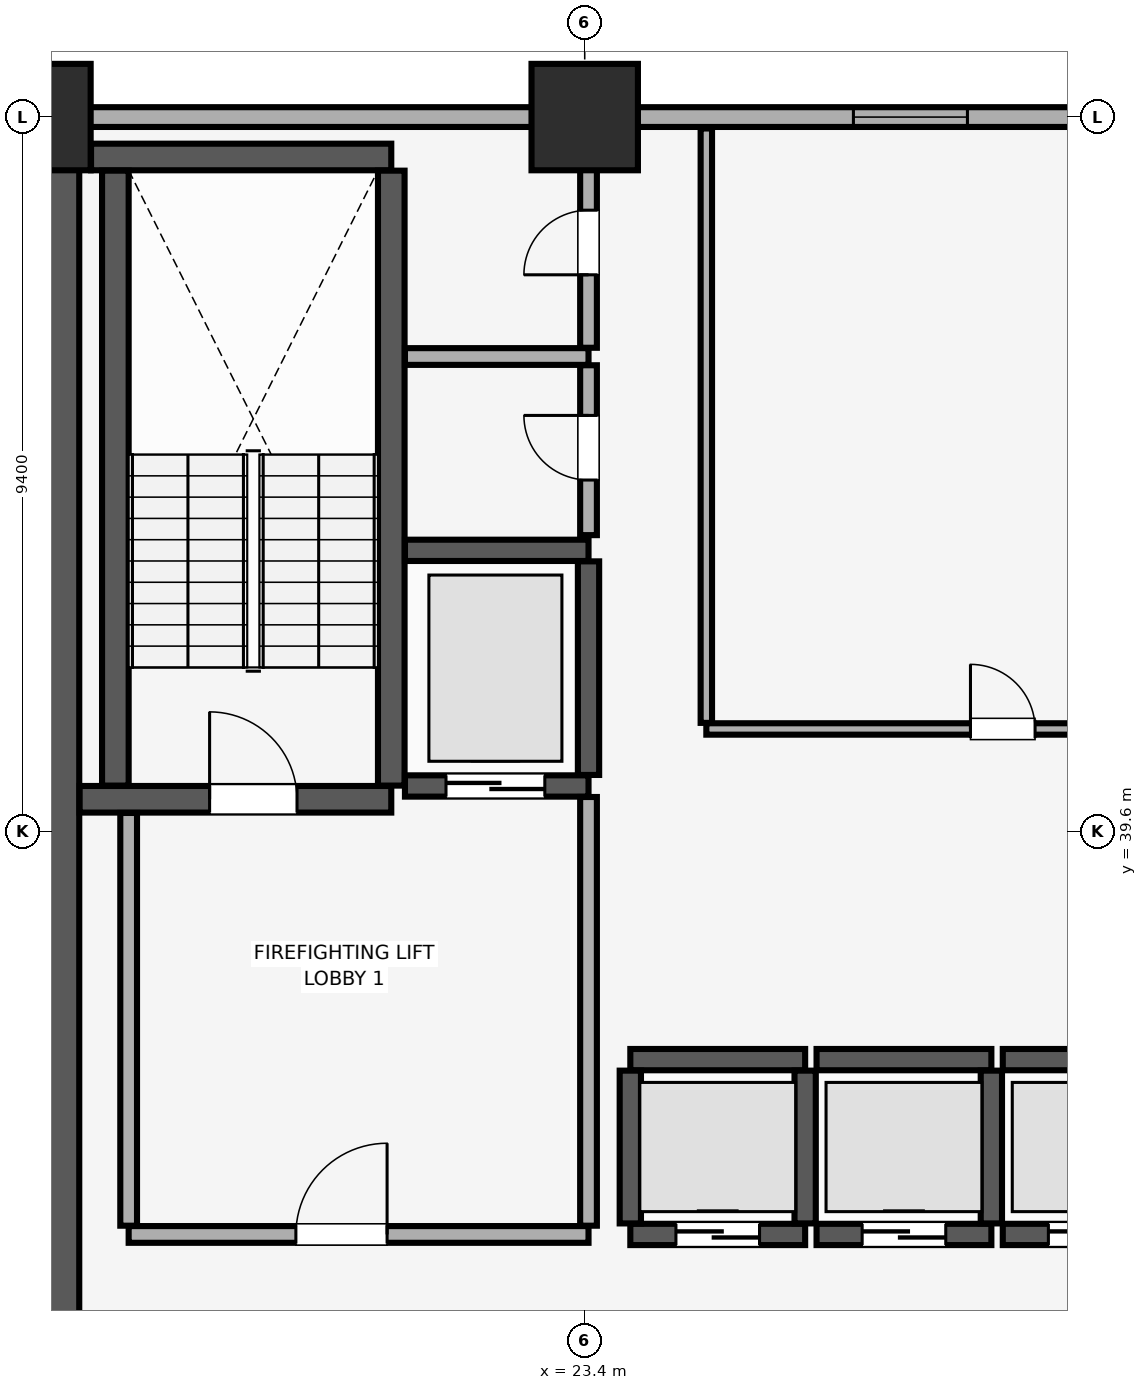
"""IFC4 building model, lengths in metres.
Left out: names, types, materials, properties, quantities, classifications, styles, units other than length and angle.
Written with IfcOpenShell. Run it as: python <this file> out.ifc"""

import sys

from ifc_helpers import new_model, si_unit, direction, frame, frame_2d, origin, origin_2d, place, context, subcontext, project, spatial, rectangle, extrude, element, fill, save


model = new_model("IFC4")
c1 = context("Model", 3, precision=1e-05, world=origin(), true_north=direction((0.0, 1.0)))
c2 = subcontext(c1, "Body", "Model", "MODEL_VIEW")
j1 = project(units=[si_unit("LENGTHUNIT", "METRE"), si_unit("PLANEANGLEUNIT", "RADIAN")], contexts=[c1])
p1 = place(None, origin())
s1 = spatial("IfcSite", under=j1, at=p1, CompositionType="ELEMENT")
p2 = place(p1, origin())
s2 = spatial("IfcBuilding", under=s1, at=p2, CompositionType="ELEMENT")
p3 = place(p2, frame((0.0, 0.0, 46.4)))
s3 = spatial("IfcBuildingStorey", under=s2, at=p3, CompositionType="ELEMENT", Elevation=46.4)
for number, where, z_axis, x_axis in (
    (1, (16.2, 49.0, 0.0), (0.0, 0.0, 1.0), (1.0, 0.0, 0.0)),
    (2, (23.4, 49.0, 0.0), (0.0, 0.0, 1.0), (1.0, 0.0, 0.0)),
):
    element("IfcColumn", number, at=place(p3, frame(where, z_axis=z_axis, x_axis=x_axis)), inside=s3, PredefinedType="COLUMN", context=c2, shape_type="SweptSolid", body=[
        extrude(rectangle(XDim=1.4, YDim=1.4, at=origin_2d()), origin(), (0.0, 0.0, 1.0), 3.51),
    ])
p4 = place(p3, frame((79.8, 49.0, 0.0), z_axis=(0.0, 0.0, 1.0), x_axis=(-1.0, 0.0, 0.0)))
e3 = element("IfcWall", 3, at=p4, inside=s3, PredefinedType="SOLIDWALL", context=c2, shape_type="SweptSolid", body=[
    extrude(rectangle(XDim=75.6, YDim=0.26, at=frame_2d((37.8, 0.0))), origin(), (0.0, 0.0, 1.0), 2.56),
])
p5 = place(p4, frame((72.565, 0.0, 0.85)))
e4 = element("IfcOpeningElement", 4, at=p5, cuts=e3, PredefinedType="OPENING", context=c2, shape_type="SweptSolid", body=[
    extrude(rectangle(XDim=1.5, YDim=1.4, at=frame_2d((0.75, 0.7))), frame((0.0, 0.14, 0.0), z_axis=(0.0, -1.0, 0.0), x_axis=(1.0, 0.0, 0.0)), (0.0, 0.0, 1.0), 0.28),
])
p6 = place(p4, frame((67.45, 0.0, 0.85)))
e5 = element("IfcOpeningElement", 5, at=p6, cuts=e3, PredefinedType="OPENING", context=c2, shape_type="SweptSolid", body=[
    extrude(rectangle(XDim=1.5, YDim=1.4, at=frame_2d((0.75, 0.7))), frame((0.0, 0.14, 0.0), z_axis=(0.0, -1.0, 0.0), x_axis=(1.0, 0.0, 0.0)), (0.0, 0.0, 1.0), 0.28),
])
p7 = place(p4, frame((6.65, 0.0, 0.85)))
e6 = element("IfcOpeningElement", 6, at=p7, cuts=e3, PredefinedType="OPENING", context=c2, shape_type="SweptSolid", body=[
    extrude(rectangle(XDim=1.5, YDim=1.4, at=frame_2d((0.75, 0.7))), frame((0.0, 0.14, 0.0), z_axis=(0.0, -1.0, 0.0), x_axis=(1.0, 0.0, 0.0)), (0.0, 0.0, 1.0), 0.28),
])
p8 = place(p4, frame((1.535, 0.0, 0.85)))
e7 = element("IfcOpeningElement", 7, at=p8, cuts=e3, PredefinedType="OPENING", context=c2, shape_type="SweptSolid", body=[
    extrude(rectangle(XDim=1.5, YDim=1.4, at=frame_2d((0.75, 0.7))), frame((0.0, 0.14, 0.0), z_axis=(0.0, -1.0, 0.0), x_axis=(1.0, 0.0, 0.0)), (0.0, 0.0, 1.0), 0.28),
])
p9 = place(p4, frame((51.365, 0.0, 0.9)))
e8 = element("IfcOpeningElement", 8, at=p9, cuts=e3, PredefinedType="OPENING", context=c2, shape_type="SweptSolid", body=[
    extrude(rectangle(XDim=1.5, YDim=1.4, at=frame_2d((0.75, 0.7))), frame((0.0, 0.14, 0.0), z_axis=(0.0, -1.0, 0.0), x_axis=(1.0, 0.0, 0.0)), (0.0, 0.0, 1.0), 0.28),
])
p10 = place(p4, frame((44.55, 0.0, 0.9)))
e9 = element("IfcOpeningElement", 9, at=p10, cuts=e3, PredefinedType="OPENING", context=c2, shape_type="SweptSolid", body=[
    extrude(rectangle(XDim=1.5, YDim=1.4, at=frame_2d((0.75, 0.7))), frame((0.0, 0.14, 0.0), z_axis=(0.0, -1.0, 0.0), x_axis=(1.0, 0.0, 0.0)), (0.0, 0.0, 1.0), 0.28),
])
p11 = place(p4, frame((28.1, 0.0, 0.9)))
e10 = element("IfcOpeningElement", 10, at=p11, cuts=e3, PredefinedType="OPENING", context=c2, shape_type="SweptSolid", body=[
    extrude(rectangle(XDim=1.5, YDim=1.4, at=frame_2d((0.75, 0.7))), frame((0.0, 0.14, 0.0), z_axis=(0.0, -1.0, 0.0), x_axis=(1.0, 0.0, 0.0)), (0.0, 0.0, 1.0), 0.28),
])
p12 = place(p4, frame((23.485, 0.0, 0.9)))
e11 = element("IfcOpeningElement", 11, at=p12, cuts=e3, PredefinedType="OPENING", context=c2, shape_type="SweptSolid", body=[
    extrude(rectangle(XDim=1.5, YDim=1.4, at=frame_2d((0.75, 0.7))), frame((0.0, 0.14, 0.0), z_axis=(0.0, -1.0, 0.0), x_axis=(1.0, 0.0, 0.0)), (0.0, 0.0, 1.0), 0.28),
])
p13 = place(p3, frame((16.2, 29.4, 0.0), z_axis=(0.0, 0.0, 1.0), x_axis=(0.0, 1.0, 0.0)))
e12 = element("IfcWall", 12, at=p13, inside=s3, PredefinedType="SHEAR", context=c2, shape_type="SweptSolid", body=[
    extrude(rectangle(XDim=19.2, YDim=1.1, at=frame_2d((9.6, 0.0))), origin(), (0.0, 0.0, 1.0), 3.51),
])
p14 = place(p3, frame((16.755, 40.025, 0.0), z_axis=(0.0, 0.0, 1.0), x_axis=(1.0, 0.0, 0.0)))
e13 = element("IfcWall", 13, at=p14, inside=s3, PredefinedType="SHEAR", context=c2, shape_type="SweptSolid", body=[
    extrude(rectangle(XDim=4.1, YDim=0.35, at=frame_2d((2.05, 0.0))), origin(), (0.0, 0.0, 1.0), 3.51),
])
p15 = place(p14, frame((1.71, 0.0, 0.0)))
e14 = element("IfcOpeningElement", 14, at=p15, cuts=e13, PredefinedType="OPENING", context=c2, shape_type="SweptSolid", body=[
    extrude(rectangle(XDim=1.15, YDim=2.15, at=frame_2d((0.575, 1.075))), frame((0.0, 0.185, 0.0), z_axis=(0.0, -1.0, 0.0), x_axis=(1.0, 0.0, 0.0)), (0.0, 0.0, 1.0), 0.37),
])
p16 = place(p3, frame((16.905, 48.475, 0.0), z_axis=(0.0, 0.0, 1.0), x_axis=(1.0, 0.0, 0.0)))
e15 = element("IfcWall", 15, at=p16, inside=s3, PredefinedType="SHEAR", context=c2, shape_type="SweptSolid", body=[
    extrude(rectangle(XDim=3.95, YDim=0.35, at=frame_2d((1.975, 0.0))), origin(), (0.0, 0.0, 1.0), 3.51),
])
for number, where, z_axis, x_axis in (
    (16, (17.225, 40.205, 0.0), (0.0, 0.0, 1.0), (0.0, 1.0, 0.0)),
    (17, (20.855, 40.205, 0.0), (0.0, 0.0, 1.0), (0.0, 1.0, 0.0)),
):
    element("IfcWall", number, at=place(p3, frame(where, z_axis=z_axis, x_axis=x_axis)), inside=s3, PredefinedType="SHEAR", context=c2, shape_type="SweptSolid", body=[
        extrude(rectangle(XDim=8.09, YDim=0.35, at=frame_2d((4.045, 0.0))), origin(), (0.0, 0.0, 1.0), 3.51),
    ])
p17 = place(p3, frame((24.0, 34.3, 0.0), z_axis=(0.0, 0.0, 1.0), x_axis=(1.0, 0.0, 0.0)))
e18 = element("IfcWall", 18, at=p17, inside=s3, PredefinedType="SHEAR", context=c2, shape_type="SweptSolid", body=[
    extrude(rectangle(XDim=2.3, YDim=0.28, at=frame_2d((1.15, 0.0))), origin(), (0.0, 0.0, 1.0), 3.51),
])
p18 = place(p17, frame((0.6, 0.0, 0.0)))
e19 = element("IfcOpeningElement", 19, at=p18, cuts=e18, PredefinedType="OPENING", context=c2, shape_type="SweptSolid", body=[
    extrude(rectangle(XDim=1.1, YDim=2.2, at=frame_2d((0.55, 1.1))), frame((0.0, 0.15, 0.0), z_axis=(0.0, -1.0, 0.0), x_axis=(1.0, 0.0, 0.0)), (0.0, 0.0, 1.0), 0.3),
])
p19 = place(p3, frame((24.0, 36.6, 0.0), z_axis=(0.0, 0.0, 1.0), x_axis=(1.0, 0.0, 0.0)))
e20 = element("IfcWall", 20, at=p19, inside=s3, PredefinedType="SHEAR", context=c2, shape_type="SweptSolid", body=[
    extrude(rectangle(XDim=2.3, YDim=0.28, at=frame_2d((1.15, 0.0))), origin(), (0.0, 0.0, 1.0), 3.51),
])
for number, where, z_axis, x_axis in (
    (21, (24.0, 34.445, 0.0), (0.0, 0.0, 1.0), (0.0, 1.0, 0.0)),
    (22, (26.3, 34.445, 0.0), (0.0, 0.0, 1.0), (0.0, 1.0, 0.0)),
):
    element("IfcWall", number, at=place(p3, frame(where, z_axis=z_axis, x_axis=x_axis)), inside=s3, PredefinedType="SHEAR", context=c2, shape_type="SweptSolid", body=[
        extrude(rectangle(XDim=2.01, YDim=0.28, at=frame_2d((1.005, 0.0))), origin(), (0.0, 0.0, 1.0), 3.51),
    ])
p20 = place(p3, frame((26.45, 34.3, 0.0), z_axis=(0.0, 0.0, 1.0), x_axis=(1.0, 0.0, 0.0)))
e23 = element("IfcWall", 23, at=p20, inside=s3, PredefinedType="SHEAR", context=c2, shape_type="SweptSolid", body=[
    extrude(rectangle(XDim=2.3, YDim=0.28, at=frame_2d((1.15, 0.0))), origin(), (0.0, 0.0, 1.0), 3.51),
])
p21 = place(p20, frame((0.6, 0.0, 0.0)))
e24 = element("IfcOpeningElement", 24, at=p21, cuts=e23, PredefinedType="OPENING", context=c2, shape_type="SweptSolid", body=[
    extrude(rectangle(XDim=1.1, YDim=2.2, at=frame_2d((0.55, 1.1))), frame((0.0, 0.15, 0.0), z_axis=(0.0, -1.0, 0.0), x_axis=(1.0, 0.0, 0.0)), (0.0, 0.0, 1.0), 0.3),
])
p22 = place(p3, frame((26.45, 36.6, 0.0), z_axis=(0.0, 0.0, 1.0), x_axis=(1.0, 0.0, 0.0)))
e25 = element("IfcWall", 25, at=p22, inside=s3, PredefinedType="SHEAR", context=c2, shape_type="SweptSolid", body=[
    extrude(rectangle(XDim=2.3, YDim=0.28, at=frame_2d((1.15, 0.0))), origin(), (0.0, 0.0, 1.0), 3.51),
])
p23 = place(p3, frame((28.75, 34.445, 0.0), z_axis=(0.0, 0.0, 1.0), x_axis=(0.0, 1.0, 0.0)))
e26 = element("IfcWall", 26, at=p23, inside=s3, PredefinedType="SHEAR", context=c2, shape_type="SweptSolid", body=[
    extrude(rectangle(XDim=2.01, YDim=0.28, at=frame_2d((1.005, 0.0))), origin(), (0.0, 0.0, 1.0), 3.51),
])
p24 = place(p3, frame((28.9, 34.3, 0.0), z_axis=(0.0, 0.0, 1.0), x_axis=(1.0, 0.0, 0.0)))
e27 = element("IfcWall", 27, at=p24, inside=s3, PredefinedType="SHEAR", context=c2, shape_type="SweptSolid", body=[
    extrude(rectangle(XDim=2.3, YDim=0.28, at=frame_2d((1.15, 0.0))), origin(), (0.0, 0.0, 1.0), 3.51),
])
p25 = place(p24, frame((0.6, 0.0, 0.0)))
e28 = element("IfcOpeningElement", 28, at=p25, cuts=e27, PredefinedType="OPENING", context=c2, shape_type="SweptSolid", body=[
    extrude(rectangle(XDim=1.1, YDim=2.2, at=frame_2d((0.55, 1.1))), frame((0.0, 0.15, 0.0), z_axis=(0.0, -1.0, 0.0), x_axis=(1.0, 0.0, 0.0)), (0.0, 0.0, 1.0), 0.3),
])
p26 = place(p3, frame((28.9, 36.6, 0.0), z_axis=(0.0, 0.0, 1.0), x_axis=(1.0, 0.0, 0.0)))
e29 = element("IfcWall", 29, at=p26, inside=s3, PredefinedType="SHEAR", context=c2, shape_type="SweptSolid", body=[
    extrude(rectangle(XDim=2.3, YDim=0.28, at=frame_2d((1.15, 0.0))), origin(), (0.0, 0.0, 1.0), 3.51),
])
p27 = place(p3, frame((21.035, 40.2, 0.0), z_axis=(0.0, 0.0, 1.0), x_axis=(1.0, 0.0, 0.0)))
e30 = element("IfcWall", 30, at=p27, inside=s3, PredefinedType="SHEAR", context=c2, shape_type="SweptSolid", body=[
    extrude(rectangle(XDim=2.415, YDim=0.28, at=frame_2d((1.208, 0.0))), origin(), (0.0, 0.0, 1.0), 3.51),
])
p28 = place(p27, frame((0.54, 0.0, 0.0)))
e31 = element("IfcOpeningElement", 31, at=p28, cuts=e30, PredefinedType="OPENING", context=c2, shape_type="SweptSolid", body=[
    extrude(rectangle(XDim=1.3, YDim=2.3, at=frame_2d((0.65, 1.15))), frame((0.0, 0.15, 0.0), z_axis=(0.0, -1.0, 0.0), x_axis=(1.0, 0.0, 0.0)), (0.0, 0.0, 1.0), 0.3),
])
p29 = place(p3, frame((21.035, 43.3, 0.0), z_axis=(0.0, 0.0, 1.0), x_axis=(1.0, 0.0, 0.0)))
e32 = element("IfcWall", 32, at=p29, inside=s3, PredefinedType="SHEAR", context=c2, shape_type="SweptSolid", body=[
    extrude(rectangle(XDim=2.415, YDim=0.28, at=frame_2d((1.208, 0.0))), origin(), (0.0, 0.0, 1.0), 3.51),
])
p30 = place(p3, frame((23.45, 40.345, 0.0), z_axis=(0.0, 0.0, 1.0), x_axis=(0.0, 1.0, 0.0)))
e33 = element("IfcWall", 33, at=p30, inside=s3, PredefinedType="SHEAR", context=c2, shape_type="SweptSolid", body=[
    extrude(rectangle(XDim=2.81, YDim=0.28, at=frame_2d((1.405, 0.0))), origin(), (0.0, 0.0, 1.0), 3.51),
])
p31 = place(p3, frame((17.4, 34.3, 0.0), z_axis=(0.0, 0.0, 1.0), x_axis=(1.0, 0.0, 0.0)))
e34 = element("IfcWall", 34, at=p31, inside=s3, PredefinedType="PARTITIONING", context=c2, shape_type="SweptSolid", body=[
    extrude(rectangle(XDim=6.05, YDim=0.22, at=frame_2d((3.025, 0.0))), origin(), (0.0, 0.0, 1.0), 3.51),
])
p32 = place(p31, frame((2.2, 0.0, 0.0)))
e35 = element("IfcOpeningElement", 35, at=p32, cuts=e34, PredefinedType="OPENING", context=c2, shape_type="SweptSolid", body=[
    extrude(rectangle(XDim=1.2, YDim=2.15, at=frame_2d((0.6, 1.075))), frame((0.0, 0.12, 0.0), z_axis=(0.0, -1.0, 0.0), x_axis=(1.0, 0.0, 0.0)), (0.0, 0.0, 1.0), 0.24),
])
p33 = place(p3, frame((17.4, 34.415, 0.0), z_axis=(0.0, 0.0, 1.0), x_axis=(0.0, 1.0, 0.0)))
e36 = element("IfcWall", 36, at=p33, inside=s3, PredefinedType="PARTITIONING", context=c2, shape_type="SweptSolid", body=[
    extrude(rectangle(XDim=5.43, YDim=0.22, at=frame_2d((2.715, 0.0))), origin(), (0.0, 0.0, 1.0), 3.51),
])
p34 = place(p3, frame((23.45, 34.415, 0.0), z_axis=(0.0, 0.0, 1.0), x_axis=(0.0, 1.0, 0.0)))
e37 = element("IfcWall", 37, at=p34, inside=s3, PredefinedType="PARTITIONING", context=c2, shape_type="SweptSolid", body=[
    extrude(rectangle(XDim=5.64, YDim=0.22, at=frame_2d((2.82, 0.0))), origin(), (0.0, 0.0, 1.0), 3.51),
])
p35 = place(p3, frame((21.035, 45.85, 0.0), z_axis=(0.0, 0.0, 1.0), x_axis=(1.0, 0.0, 0.0)))
e38 = element("IfcWall", 38, at=p35, inside=s3, PredefinedType="PARTITIONING", context=c2, shape_type="SweptSolid", body=[
    extrude(rectangle(XDim=2.415, YDim=0.22, at=frame_2d((1.208, 0.0))), origin(), (0.0, 0.0, 1.0), 3.51),
])
p36 = place(p3, frame((23.45, 43.5, 0.0), z_axis=(0.0, 0.0, 1.0), x_axis=(0.0, 1.0, 0.0)))
e39 = element("IfcWall", 39, at=p36, inside=s3, PredefinedType="PARTITIONING", context=c2, shape_type="SweptSolid", body=[
    extrude(rectangle(XDim=2.235, YDim=0.22, at=frame_2d((1.118, 0.0))), origin(), (0.0, 0.0, 1.0), 3.51),
])
p37 = place(p36, frame((0.725, 0.0, 0.0)))
e40 = element("IfcOpeningElement", 40, at=p37, cuts=e39, PredefinedType="OPENING", context=c2, shape_type="SweptSolid", body=[
    extrude(rectangle(XDim=0.85, YDim=2.1, at=frame_2d((0.425, 1.05))), frame((0.0, 0.12, 0.0), z_axis=(0.0, -1.0, 0.0), x_axis=(1.0, 0.0, 0.0)), (0.0, 0.0, 1.0), 0.24),
])
p38 = place(p3, frame((23.45, 45.965, 0.0), z_axis=(0.0, 0.0, 1.0), x_axis=(0.0, 1.0, 0.0)))
e41 = element("IfcWall", 41, at=p38, inside=s3, PredefinedType="PARTITIONING", context=c2, shape_type="SweptSolid", body=[
    extrude(rectangle(XDim=2.885, YDim=0.22, at=frame_2d((1.442, 0.0))), origin(), (0.0, 0.0, 1.0), 3.51),
])
p39 = place(p38, frame((0.96, 0.0, 0.0)))
e42 = element("IfcOpeningElement", 42, at=p39, cuts=e41, PredefinedType="OPENING", context=c2, shape_type="SweptSolid", body=[
    extrude(rectangle(XDim=0.85, YDim=2.1, at=frame_2d((0.425, 1.05))), frame((0.0, 0.12, 0.0), z_axis=(0.0, -1.0, 0.0), x_axis=(1.0, 0.0, 0.0)), (0.0, 0.0, 1.0), 0.24),
])
p40 = place(p3, frame((25.0, 40.95, 0.0), z_axis=(0.0, 0.0, 1.0), x_axis=(1.0, 0.0, 0.0)))
e43 = element("IfcWall", 43, at=p40, inside=s3, PredefinedType="PARTITIONING", context=c2, shape_type="SweptSolid", body=[
    extrude(rectangle(XDim=7.8, YDim=0.15, at=frame_2d((3.9, 0.0))), origin(), (0.0, 0.0, 1.0), 3.51),
])
p41 = place(p40, frame((3.475, 0.0, 0.0)))
e44 = element("IfcOpeningElement", 44, at=p41, cuts=e43, PredefinedType="OPENING", context=c2, shape_type="SweptSolid", body=[
    extrude(rectangle(XDim=0.85, YDim=2.1, at=frame_2d((0.425, 1.05))), frame((0.0, 0.085, 0.0), z_axis=(0.0, -1.0, 0.0), x_axis=(1.0, 0.0, 0.0)), (0.0, 0.0, 1.0), 0.17),
])
p42 = place(p3, frame((25.0, 41.03, 0.0), z_axis=(0.0, 0.0, 1.0), x_axis=(0.0, 1.0, 0.0)))
e45 = element("IfcWall", 45, at=p42, inside=s3, PredefinedType="PARTITIONING", context=c2, shape_type="SweptSolid", body=[
    extrude(rectangle(XDim=7.82, YDim=0.15, at=frame_2d((3.91, 0.0))), origin(), (0.0, 0.0, 1.0), 3.51),
])
p43 = place(p9, origin())
e46 = element("IfcWindow", 46, at=p43, inside=s3, PartitioningType="SINGLE_PANEL", PredefinedType="WINDOW", context=c2, shape_type="SweptSolid", body=[
    extrude(rectangle(XDim=1.5, YDim=1.4, at=frame_2d((0.75, 0.7))), frame((0.0, 0.03, 0.0), z_axis=(0.0, -1.0, 0.0), x_axis=(1.0, 0.0, 0.0)), (0.0, 0.0, 1.0), 0.06),
])
fill(e8, e46)
p44 = place(p15, origin())
e47 = element("IfcDoor", 47, at=p44, inside=s3, OperationType="SINGLE_SWING_LEFT", PredefinedType="DOOR", context=c2, shape_type="SweptSolid", body=[
    extrude(rectangle(XDim=1.15, YDim=2.15, at=frame_2d((0.575, 1.075))), frame((0.0, 0.025, 0.0), z_axis=(0.0, -1.0, 0.0), x_axis=(1.0, 0.0, 0.0)), (0.0, 0.0, 1.0), 0.05),
])
fill(e14, e47)
p45 = place(p18, origin())
e48 = element("IfcDoor", 48, at=p45, inside=s3, OperationType="DOUBLE_DOOR_SLIDING", PredefinedType="DOOR", context=c2, shape_type="SweptSolid", body=[
    extrude(rectangle(XDim=1.1, YDim=2.2, at=frame_2d((0.55, 1.1))), frame((0.0, 0.025, 0.0), z_axis=(0.0, -1.0, 0.0), x_axis=(1.0, 0.0, 0.0)), (0.0, 0.0, 1.0), 0.05),
])
fill(e19, e48)
p46 = place(p21, origin())
e49 = element("IfcDoor", 49, at=p46, inside=s3, OperationType="DOUBLE_DOOR_SLIDING", PredefinedType="DOOR", context=c2, shape_type="SweptSolid", body=[
    extrude(rectangle(XDim=1.1, YDim=2.2, at=frame_2d((0.55, 1.1))), frame((0.0, 0.025, 0.0), z_axis=(0.0, -1.0, 0.0), x_axis=(1.0, 0.0, 0.0)), (0.0, 0.0, 1.0), 0.05),
])
fill(e24, e49)
p47 = place(p25, origin())
e50 = element("IfcDoor", 50, at=p47, inside=s3, OperationType="DOUBLE_DOOR_SLIDING", PredefinedType="DOOR", context=c2, shape_type="SweptSolid", body=[
    extrude(rectangle(XDim=1.1, YDim=2.2, at=frame_2d((0.55, 1.1))), frame((0.0, 0.025, 0.0), z_axis=(0.0, -1.0, 0.0), x_axis=(1.0, 0.0, 0.0)), (0.0, 0.0, 1.0), 0.05),
])
fill(e28, e50)
p48 = place(p28, origin())
e51 = element("IfcDoor", 51, at=p48, inside=s3, OperationType="DOUBLE_DOOR_SLIDING", PredefinedType="DOOR", context=c2, shape_type="SweptSolid", body=[
    extrude(rectangle(XDim=1.3, YDim=2.3, at=frame_2d((0.65, 1.15))), frame((0.0, 0.025, 0.0), z_axis=(0.0, -1.0, 0.0), x_axis=(1.0, 0.0, 0.0)), (0.0, 0.0, 1.0), 0.05),
])
fill(e31, e51)
p49 = place(p32, origin())
e52 = element("IfcDoor", 52, at=p49, inside=s3, OperationType="SINGLE_SWING_RIGHT", PredefinedType="DOOR", context=c2, shape_type="SweptSolid", body=[
    extrude(rectangle(XDim=1.2, YDim=2.15, at=frame_2d((0.6, 1.075))), frame((0.0, 0.025, 0.0), z_axis=(0.0, -1.0, 0.0), x_axis=(1.0, 0.0, 0.0)), (0.0, 0.0, 1.0), 0.05),
])
fill(e35, e52)
p50 = place(p37, origin())
e53 = element("IfcDoor", 53, at=p50, inside=s3, OperationType="SINGLE_SWING_RIGHT", PredefinedType="DOOR", context=c2, shape_type="SweptSolid", body=[
    extrude(rectangle(XDim=0.85, YDim=2.1, at=frame_2d((0.425, 1.05))), frame((0.0, 0.025, 0.0), z_axis=(0.0, -1.0, 0.0), x_axis=(1.0, 0.0, 0.0)), (0.0, 0.0, 1.0), 0.05),
])
fill(e40, e53)
p51 = place(p39, origin())
e54 = element("IfcDoor", 54, at=p51, inside=s3, OperationType="SINGLE_SWING_LEFT", PredefinedType="DOOR", context=c2, shape_type="SweptSolid", body=[
    extrude(rectangle(XDim=0.85, YDim=2.1, at=frame_2d((0.425, 1.05))), frame((0.0, 0.025, 0.0), z_axis=(0.0, -1.0, 0.0), x_axis=(1.0, 0.0, 0.0)), (0.0, 0.0, 1.0), 0.05),
])
fill(e42, e54)
p52 = place(p41, origin())
e55 = element("IfcDoor", 55, at=p52, inside=s3, OperationType="SINGLE_SWING_LEFT", PredefinedType="DOOR", context=c2, shape_type="SweptSolid", body=[
    extrude(rectangle(XDim=0.85, YDim=2.1, at=frame_2d((0.425, 1.05))), frame((0.0, 0.025, 0.0), z_axis=(0.0, -1.0, 0.0), x_axis=(1.0, 0.0, 0.0)), (0.0, 0.0, 1.0), 0.05),
])
fill(e44, e55)
save(model, sys.argv[1])
